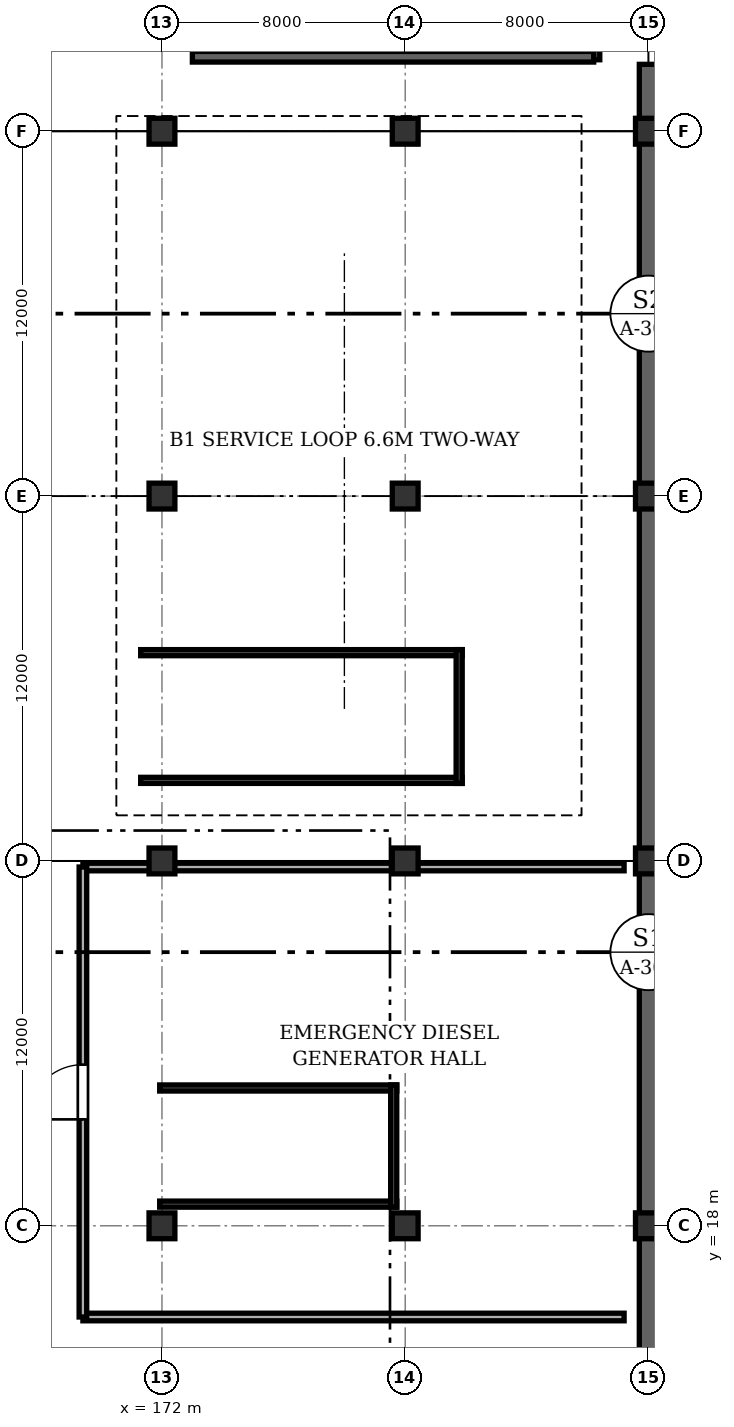
"""IFC4 building model, lengths in metres.
Left out: names, types, materials, properties, quantities, classifications, styles, units other than length and angle.
Written with IfcOpenShell. Run it as: python <this file> out.ifc"""

import sys

from ifc_helpers import new_model, si_unit, direction, frame, frame_2d, origin, origin_2d, place, context, subcontext, project, spatial, rectangle, extrude, element, fill, save


model = new_model("IFC4")
c1 = context("Model", 3, precision=1e-05, world=origin(), true_north=direction((0.0, 1.0)))
c2 = subcontext(c1, "Body", "Model", "MODEL_VIEW")
j1 = project(units=[si_unit("LENGTHUNIT", "METRE"), si_unit("PLANEANGLEUNIT", "RADIAN")], contexts=[c1])
p1 = place(None, origin())
s1 = spatial("IfcSite", under=j1, at=p1, CompositionType="ELEMENT")
p2 = place(p1, origin())
s2 = spatial("IfcBuilding", under=s1, at=p2, CompositionType="ELEMENT")
p3 = place(p2, frame((0.0, 0.0, -5.4)))
s3 = spatial("IfcBuildingStorey", under=s2, at=p3, CompositionType="ELEMENT", Elevation=-5.4)
for number, where, z_axis, x_axis in (
    (1, (172.0, 18.0, 0.0), (0.0, 0.0, 1.0), (1.0, 0.0, 0.0)),
    (2, (172.0, 30.0, 0.0), (0.0, 0.0, 1.0), (1.0, 0.0, 0.0)),
    (3, (172.0, 42.0, 0.0), (0.0, 0.0, 1.0), (1.0, 0.0, 0.0)),
    (4, (172.0, 54.0, 0.0), (0.0, 0.0, 1.0), (1.0, 0.0, 0.0)),
    (5, (180.0, 18.0, 0.0), (0.0, 0.0, 1.0), (1.0, 0.0, 0.0)),
    (6, (180.0, 30.0, 0.0), (0.0, 0.0, 1.0), (1.0, 0.0, 0.0)),
    (7, (180.0, 42.0, 0.0), (0.0, 0.0, 1.0), (1.0, 0.0, 0.0)),
    (8, (180.0, 54.0, 0.0), (0.0, 0.0, 1.0), (1.0, 0.0, 0.0)),
    (9, (188.0, 18.0, 0.0), (0.0, 0.0, 1.0), (1.0, 0.0, 0.0)),
    (10, (188.0, 30.0, 0.0), (0.0, 0.0, 1.0), (1.0, 0.0, 0.0)),
    (11, (188.0, 42.0, 0.0), (0.0, 0.0, 1.0), (1.0, 0.0, 0.0)),
    (12, (188.0, 54.0, 0.0), (0.0, 0.0, 1.0), (1.0, 0.0, 0.0)),
):
    element("IfcColumn", number, at=place(p3, frame(where, z_axis=z_axis, x_axis=x_axis)), inside=s3, PredefinedType="COLUMN", context=c2, shape_type="SweptSolid", body=[
        extrude(rectangle(XDim=0.85, YDim=0.85, at=origin_2d()), origin(), (0.0, 0.0, 1.0), 5.4),
    ])
p4 = place(p3, frame((188.0, 0.0, 0.0), z_axis=(0.0, 0.0, 1.0), x_axis=(0.0, 1.0, 0.0)))
e13 = element("IfcWall", 13, at=p4, inside=s3, PredefinedType="USERDEFINED", context=c2, shape_type="SweptSolid", body=[
    extrude(rectangle(XDim=56.2, YDim=0.6, at=frame_2d((28.1, 0.0))), origin(), (0.0, 0.0, 1.0), 5.1),
])
p5 = place(p3, frame((186.2, 56.35, 0.0), z_axis=(0.0, 0.0, 1.0), x_axis=(0.0, 1.0, 0.0)))
e14 = element("IfcWall", 14, at=p5, inside=s3, PredefinedType="SHEAR", context=c2, shape_type="SweptSolid", body=[
    extrude(rectangle(XDim=4.7, YDim=0.4, at=frame_2d((2.35, 0.0))), origin(), (0.0, 0.0, 1.0), 5.1),
])
p6 = place(p3, frame((173.0, 56.45, 0.0), z_axis=(0.0, 0.0, 1.0), x_axis=(1.0, 0.0, 0.0)))
e15 = element("IfcWall", 15, at=p6, inside=s3, PredefinedType="SHEAR", context=c2, shape_type="SweptSolid", body=[
    extrude(rectangle(XDim=13.2, YDim=0.35, at=frame_2d((6.6, 0.0))), origin(), (0.0, 0.0, 1.0), 6.62),
])
for number, where, z_axis, x_axis in (
    (16, (171.3, 32.65, 0.0), (0.0, 0.0, 1.0), (1.0, 0.0, 0.0)),
    (17, (181.875, 36.85, 0.0), (0.0, 0.0, 1.0), (-1.0, 0.0, 0.0)),
):
    element("IfcWall", number, at=place(p3, frame(where, z_axis=z_axis, x_axis=x_axis)), inside=s3, PredefinedType="SOLIDWALL", context=c2, shape_type="SweptSolid", body=[
        extrude(rectangle(XDim=10.575, YDim=0.2, at=frame_2d((5.288, 0.0))), origin(), (0.0, 0.0, 1.0), 5.1),
    ])
p7 = place(p3, frame((181.775, 32.55, 0.0), z_axis=(0.0, 0.0, 1.0), x_axis=(0.0, 1.0, 0.0)))
e18 = element("IfcWall", 18, at=p7, inside=s3, PredefinedType="SOLIDWALL", context=c2, shape_type="SweptSolid", body=[
    extrude(rectangle(XDim=4.4, YDim=0.2, at=frame_2d((2.2, 0.0))), origin(), (0.0, 0.0, 1.0), 5.1),
])
for number, where, z_axis, x_axis in (
    (19, (171.925, 18.712, 0.0), (0.0, 0.0, 1.0), (1.0, 0.0, 0.0)),
    (20, (179.722, 22.532, 0.0), (0.0, 0.0, 1.0), (-1.0, 0.0, 0.0)),
):
    element("IfcWall", number, at=place(p3, frame(where, z_axis=z_axis, x_axis=x_axis)), inside=s3, PredefinedType="SOLIDWALL", context=c2, shape_type="SweptSolid", body=[
        extrude(rectangle(XDim=7.797, YDim=0.2, at=frame_2d((3.899, 0.0))), origin(), (0.0, 0.0, 1.0), 5.1),
    ])
p8 = place(p3, frame((179.623, 18.613, 0.0), z_axis=(0.0, 0.0, 1.0), x_axis=(0.0, 1.0, 0.0)))
e21 = element("IfcWall", 21, at=p8, inside=s3, PredefinedType="SOLIDWALL", context=c2, shape_type="SweptSolid", body=[
    extrude(rectangle(XDim=4.02, YDim=0.2, at=frame_2d((2.01, 0.0))), origin(), (0.0, 0.0, 1.0), 5.1),
])
for number, where, z_axis, x_axis in (
    (22, (187.2, 15.0, 0.0), (0.0, 0.0, 1.0), (-1.0, 0.0, 0.0)),
    (23, (169.4, 29.8, 0.0), (0.0, 0.0, 1.0), (1.0, 0.0, 0.0)),
):
    element("IfcWall", number, at=place(p3, frame(where, z_axis=z_axis, x_axis=x_axis)), inside=s3, PredefinedType="SOLIDWALL", context=c2, shape_type="SweptSolid", body=[
        extrude(rectangle(XDim=17.8, YDim=0.25, at=frame_2d((8.9, 0.0))), origin(), (0.0, 0.0, 1.0), 4.4),
    ])
p9 = place(p3, frame((169.4, 15.0, 0.0), z_axis=(0.0, 0.0, 1.0), x_axis=(0.0, 1.0, 0.0)))
e24 = element("IfcWall", 24, at=p9, inside=s3, PredefinedType="SOLIDWALL", context=c2, shape_type="SweptSolid", body=[
    extrude(rectangle(XDim=14.8, YDim=0.25, at=frame_2d((7.4, 0.0))), origin(), (0.0, 0.0, 1.0), 4.4),
])
p10 = place(p9, frame((6.5, 0.0, 0.0)))
e25 = element("IfcOpeningElement", 25, at=p10, cuts=e24, PredefinedType="OPENING", context=c2, shape_type="SweptSolid", body=[
    extrude(rectangle(XDim=1.8, YDim=2.2, at=frame_2d((0.9, 1.1))), frame((0.0, 0.135, 0.0), z_axis=(0.0, -1.0, 0.0), x_axis=(1.0, 0.0, 0.0)), (0.0, 0.0, 1.0), 0.27),
])
p11 = place(p10, origin())
e26 = element("IfcDoor", 26, at=p11, inside=s3, OperationType="SINGLE_SWING_LEFT", PredefinedType="DOOR", context=c2, shape_type="SweptSolid", body=[
    extrude(rectangle(XDim=1.8, YDim=2.2, at=frame_2d((0.9, 1.1))), frame((0.0, 0.025, 0.0), z_axis=(0.0, -1.0, 0.0), x_axis=(1.0, 0.0, 0.0)), (0.0, 0.0, 1.0), 0.05),
])
fill(e25, e26)
save(model, sys.argv[1])
